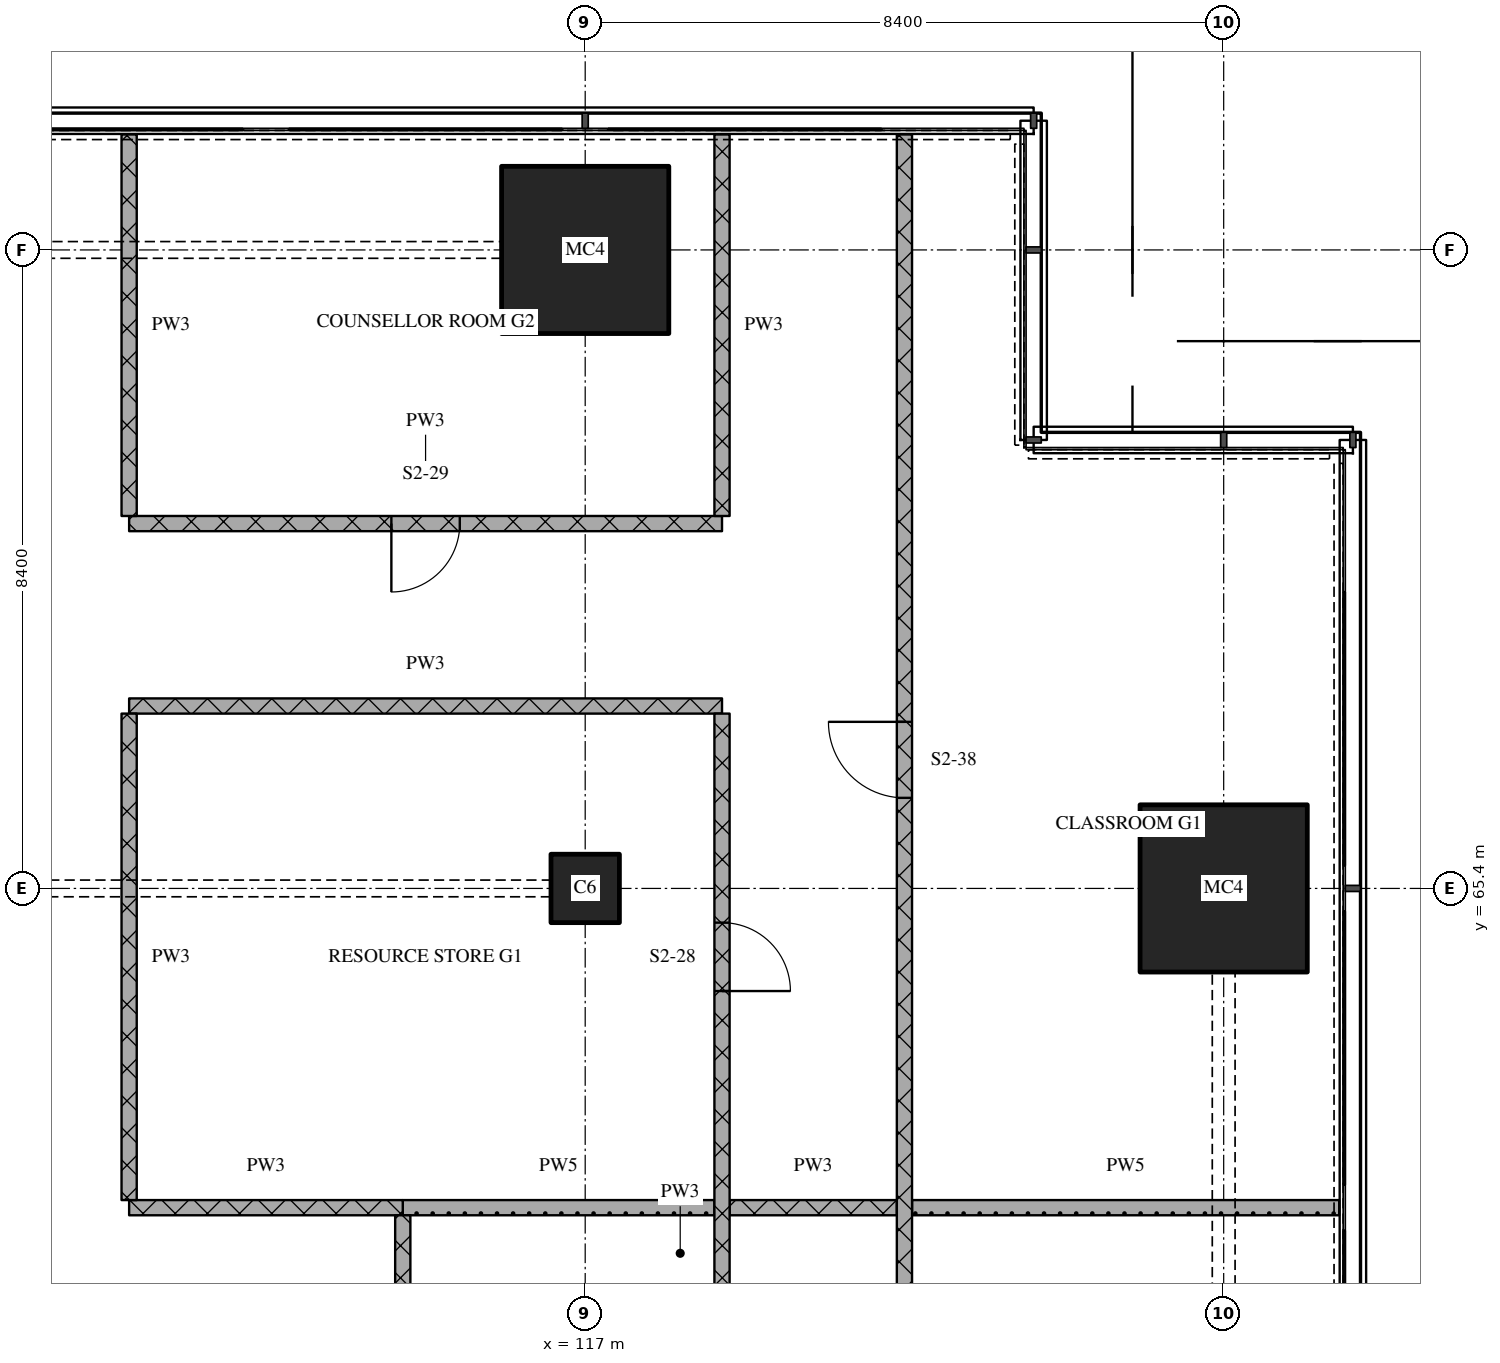
"""IFC4 building model, lengths in metres.
Left out: names, types, materials, properties, quantities, classifications, styles, units other than length and angle.
Written with IfcOpenShell. Run it as: python <this file> out.ifc"""

import sys

from ifc_helpers import new_model, si_unit, direction, frame, frame_2d, origin, origin_2d, place, context, subcontext, project, spatial, rectangle, extrude, element, fill, save


model = new_model("IFC4")
c1 = context("Model", 3, precision=1e-05, world=origin(), true_north=direction((0.0, 1.0)))
c2 = subcontext(c1, "Body", "Model", "MODEL_VIEW")
j1 = project(units=[si_unit("LENGTHUNIT", "METRE"), si_unit("PLANEANGLEUNIT", "RADIAN")], contexts=[c1])
p1 = place(None, origin())
s1 = spatial("IfcSite", under=j1, at=p1, CompositionType="ELEMENT")
p2 = place(p1, origin())
s2 = spatial("IfcBuilding", under=s1, at=p2, CompositionType="ELEMENT")
p3 = place(p2, frame((0.0, 0.0, 23.7)))
s3 = spatial("IfcBuildingStorey", under=s2, at=p3, CompositionType="ELEMENT", Elevation=23.7)
p4 = place(p3, frame((117.0, 65.4, 0.0), z_axis=(0.0, 0.0, 1.0), x_axis=(1.0, 0.0, 0.0)))
e1 = element("IfcColumn", 1, at=p4, inside=s3, PredefinedType="COLUMN", context=c2, shape_type="SweptSolid", body=[
    extrude(rectangle(XDim=0.9, YDim=0.9, at=origin_2d()), origin(), (0.0, 0.0, 1.0), 4.5),
])
for number, where, z_axis, x_axis in (
    (2, (117.0, 73.8, 0.0), (0.0, 0.0, 1.0), (1.0, 0.0, 0.0)),
    (3, (125.4, 65.4, 0.0), (0.0, 0.0, 1.0), (1.0, 0.0, 0.0)),
):
    element("IfcColumn", number, at=place(p3, frame(where, z_axis=z_axis, x_axis=x_axis)), inside=s3, PredefinedType="COLUMN", context=c2, shape_type="SweptSolid", body=[
        extrude(rectangle(XDim=2.2, YDim=2.2, at=origin_2d()), origin(), (0.0, 0.0, 1.0), 4.5),
    ])
p5 = place(p3, frame((111.0, 61.2, 0.0), z_axis=(0.0, 0.0, 1.0), x_axis=(1.0, 0.0, 0.0)))
e4 = element("IfcWall", 4, at=p5, inside=s3, PredefinedType="PARTITIONING", context=c2, shape_type="SweptSolid", body=[
    extrude(rectangle(XDim=3.6, YDim=0.2, at=frame_2d((1.8, 0.0))), origin(), (0.0, 0.0, 1.0), 4.2),
])
p6 = place(p3, frame((118.9, 61.2, 0.0), z_axis=(0.0, 0.0, 1.0), x_axis=(1.0, 0.0, 0.0)))
e5 = element("IfcWall", 5, at=p6, inside=s3, PredefinedType="PARTITIONING", context=c2, shape_type="SweptSolid", body=[
    extrude(rectangle(XDim=2.2, YDim=0.2, at=frame_2d((1.1, 0.0))), origin(), (0.0, 0.0, 1.0), 4.2),
])
p7 = place(p3, frame((114.6, 61.2, 0.0), z_axis=(0.0, 0.0, 1.0), x_axis=(1.0, 0.0, 0.0)))
e6 = element("IfcWall", 6, at=p7, inside=s3, PredefinedType="PARTITIONING", context=c2, shape_type="SweptSolid", body=[
    extrude(rectangle(XDim=4.1, YDim=0.2, at=frame_2d((2.05, 0.0))), origin(), (0.0, 0.0, 1.0), 4.2),
])
p8 = place(p3, frame((121.3, 61.2, 0.0), z_axis=(0.0, 0.0, 1.0), x_axis=(1.0, 0.0, 0.0)))
e7 = element("IfcWall", 7, at=p8, inside=s3, PredefinedType="PARTITIONING", context=c2, shape_type="SweptSolid", body=[
    extrude(rectangle(XDim=5.62, YDim=0.2, at=frame_2d((2.81, 0.0))), origin(), (0.0, 0.0, 1.0), 4.2),
])
p9 = place(p3, frame((111.0, 67.8, 0.0), z_axis=(0.0, 0.0, 1.0), x_axis=(1.0, 0.0, 0.0)))
e8 = element("IfcWall", 8, at=p9, inside=s3, PredefinedType="PARTITIONING", context=c2, shape_type="SweptSolid", body=[
    extrude(rectangle(XDim=7.8, YDim=0.2, at=frame_2d((3.9, 0.0))), origin(), (0.0, 0.0, 1.0), 4.2),
])
p10 = place(p3, frame((111.0, 70.2, 0.0), z_axis=(0.0, 0.0, 1.0), x_axis=(1.0, 0.0, 0.0)))
e9 = element("IfcWall", 9, at=p10, inside=s3, PredefinedType="PARTITIONING", context=c2, shape_type="SweptSolid", body=[
    extrude(rectangle(XDim=7.8, YDim=0.2, at=frame_2d((3.9, 0.0))), origin(), (0.0, 0.0, 1.0), 4.2),
])
p11 = place(p10, frame((3.45, 0.0, 0.0)))
e10 = element("IfcOpeningElement", 10, at=p11, cuts=e9, PredefinedType="OPENING", context=c2, shape_type="SweptSolid", body=[
    extrude(rectangle(XDim=0.9, YDim=2.1, at=frame_2d((0.45, 1.05))), frame((0.0, 0.11, 0.0), z_axis=(0.0, -1.0, 0.0), x_axis=(1.0, 0.0, 0.0)), (0.0, 0.0, 1.0), 0.22),
])
p12 = place(p3, frame((111.0, 67.7, 0.0), z_axis=(0.0, 0.0, 1.0), x_axis=(0.0, -1.0, 0.0)))
e11 = element("IfcWall", 11, at=p12, inside=s3, PredefinedType="PARTITIONING", context=c2, shape_type="SweptSolid", body=[
    extrude(rectangle(XDim=6.4, YDim=0.2, at=frame_2d((3.2, 0.0))), origin(), (0.0, 0.0, 1.0), 4.2),
])
p13 = place(p3, frame((111.0, 75.32, 0.0), z_axis=(0.0, 0.0, 1.0), x_axis=(0.0, -1.0, 0.0)))
e12 = element("IfcWall", 12, at=p13, inside=s3, PredefinedType="PARTITIONING", context=c2, shape_type="SweptSolid", body=[
    extrude(rectangle(XDim=5.02, YDim=0.2, at=frame_2d((2.51, 0.0))), origin(), (0.0, 0.0, 1.0), 4.2),
])
p14 = place(p3, frame((114.6, 61.1, 0.0), z_axis=(0.0, 0.0, 1.0), x_axis=(0.0, -1.0, 0.0)))
e13 = element("IfcWall", 13, at=p14, inside=s3, PredefinedType="PARTITIONING", context=c2, shape_type="SweptSolid", body=[
    extrude(rectangle(XDim=7.6, YDim=0.2, at=frame_2d((3.8, 0.0))), origin(), (0.0, 0.0, 1.0), 4.2),
])
p15 = place(p3, frame((118.8, 53.5, 0.0), z_axis=(0.0, 0.0, 1.0), x_axis=(0.0, 1.0, 0.0)))
e14 = element("IfcWall", 14, at=p15, inside=s3, PredefinedType="PARTITIONING", context=c2, shape_type="SweptSolid", body=[
    extrude(rectangle(XDim=14.2, YDim=0.2, at=frame_2d((7.1, 0.0))), origin(), (0.0, 0.0, 1.0), 4.2),
])
p16 = place(p15, frame((5.75, 0.0, 0.0)))
e15 = element("IfcOpeningElement", 15, at=p16, cuts=e14, PredefinedType="OPENING", context=c2, shape_type="SweptSolid", body=[
    extrude(rectangle(XDim=0.9, YDim=2.1, at=frame_2d((0.45, 1.05))), frame((0.0, 0.11, 0.0), z_axis=(0.0, -1.0, 0.0), x_axis=(1.0, 0.0, 0.0)), (0.0, 0.0, 1.0), 0.22),
])
p17 = place(p15, frame((10.55, 0.0, 0.0)))
e16 = element("IfcOpeningElement", 16, at=p17, cuts=e14, PredefinedType="OPENING", context=c2, shape_type="SweptSolid", body=[
    extrude(rectangle(XDim=0.9, YDim=2.1, at=frame_2d((0.45, 1.05))), frame((0.0, 0.11, 0.0), z_axis=(0.0, -1.0, 0.0), x_axis=(1.0, 0.0, 0.0)), (0.0, 0.0, 1.0), 0.22),
])
p18 = place(p3, frame((118.8, 75.32, 0.0), z_axis=(0.0, 0.0, 1.0), x_axis=(0.0, -1.0, 0.0)))
e17 = element("IfcWall", 17, at=p18, inside=s3, PredefinedType="PARTITIONING", context=c2, shape_type="SweptSolid", body=[
    extrude(rectangle(XDim=5.02, YDim=0.2, at=frame_2d((2.51, 0.0))), origin(), (0.0, 0.0, 1.0), 4.2),
])
p19 = place(p3, frame((121.2, 75.32, 0.0), z_axis=(0.0, 0.0, 1.0), x_axis=(0.0, -1.0, 0.0)))
e18 = element("IfcWall", 18, at=p19, inside=s3, PredefinedType="PARTITIONING", context=c2, shape_type="SweptSolid", body=[
    extrude(rectangle(XDim=32.02, YDim=0.2, at=frame_2d((16.01, 0.0))), origin(), (0.0, 0.0, 1.0), 4.2),
])
p20 = place(p19, frame((7.729, 0.0, 0.0)))
e19 = element("IfcOpeningElement", 19, at=p20, cuts=e18, PredefinedType="OPENING", context=c2, shape_type="SweptSolid", body=[
    extrude(rectangle(XDim=1.0, YDim=2.1, at=frame_2d((0.5, 1.05))), frame((0.0, 0.11, 0.0), z_axis=(0.0, -1.0, 0.0), x_axis=(1.0, 0.0, 0.0)), (0.0, 0.0, 1.0), 0.22),
])
p21 = place(p19, frame((22.62, 0.0, 0.0)))
e20 = element("IfcOpeningElement", 20, at=p21, cuts=e18, PredefinedType="OPENING", context=c2, shape_type="SweptSolid", body=[
    extrude(rectangle(XDim=1.0, YDim=2.1, at=frame_2d((0.5, 1.05))), frame((0.0, 0.11, 0.0), z_axis=(0.0, -1.0, 0.0), x_axis=(1.0, 0.0, 0.0)), (0.0, 0.0, 1.0), 0.22),
])
p22 = place(p11, origin())
e21 = element("IfcDoor", 21, at=p22, inside=s3, OperationType="SINGLE_SWING_RIGHT", PredefinedType="DOOR", context=c2, shape_type="SweptSolid", body=[
    extrude(rectangle(XDim=0.9, YDim=2.1, at=frame_2d((0.45, 1.05))), frame((0.0, 0.025, 0.0), z_axis=(0.0, -1.0, 0.0), x_axis=(1.0, 0.0, 0.0)), (0.0, 0.0, 1.0), 0.05),
])
fill(e10, e21)
p23 = place(p17, origin())
e22 = element("IfcDoor", 22, at=p23, inside=s3, OperationType="SINGLE_SWING_RIGHT", PredefinedType="DOOR", context=c2, shape_type="SweptSolid", body=[
    extrude(rectangle(XDim=0.9, YDim=2.1, at=frame_2d((0.45, 1.05))), frame((0.0, 0.025, 0.0), z_axis=(0.0, -1.0, 0.0), x_axis=(1.0, 0.0, 0.0)), (0.0, 0.0, 1.0), 0.05),
])
fill(e16, e22)
p24 = place(p20, origin())
e23 = element("IfcDoor", 23, at=p24, inside=s3, OperationType="SINGLE_SWING_RIGHT", PredefinedType="DOOR", context=c2, shape_type="SweptSolid", body=[
    extrude(rectangle(XDim=1.0, YDim=2.1, at=frame_2d((0.5, 1.05))), frame((0.0, 0.025, 0.0), z_axis=(0.0, -1.0, 0.0), x_axis=(1.0, 0.0, 0.0)), (0.0, 0.0, 1.0), 0.05),
])
fill(e19, e23)
save(model, sys.argv[1])
